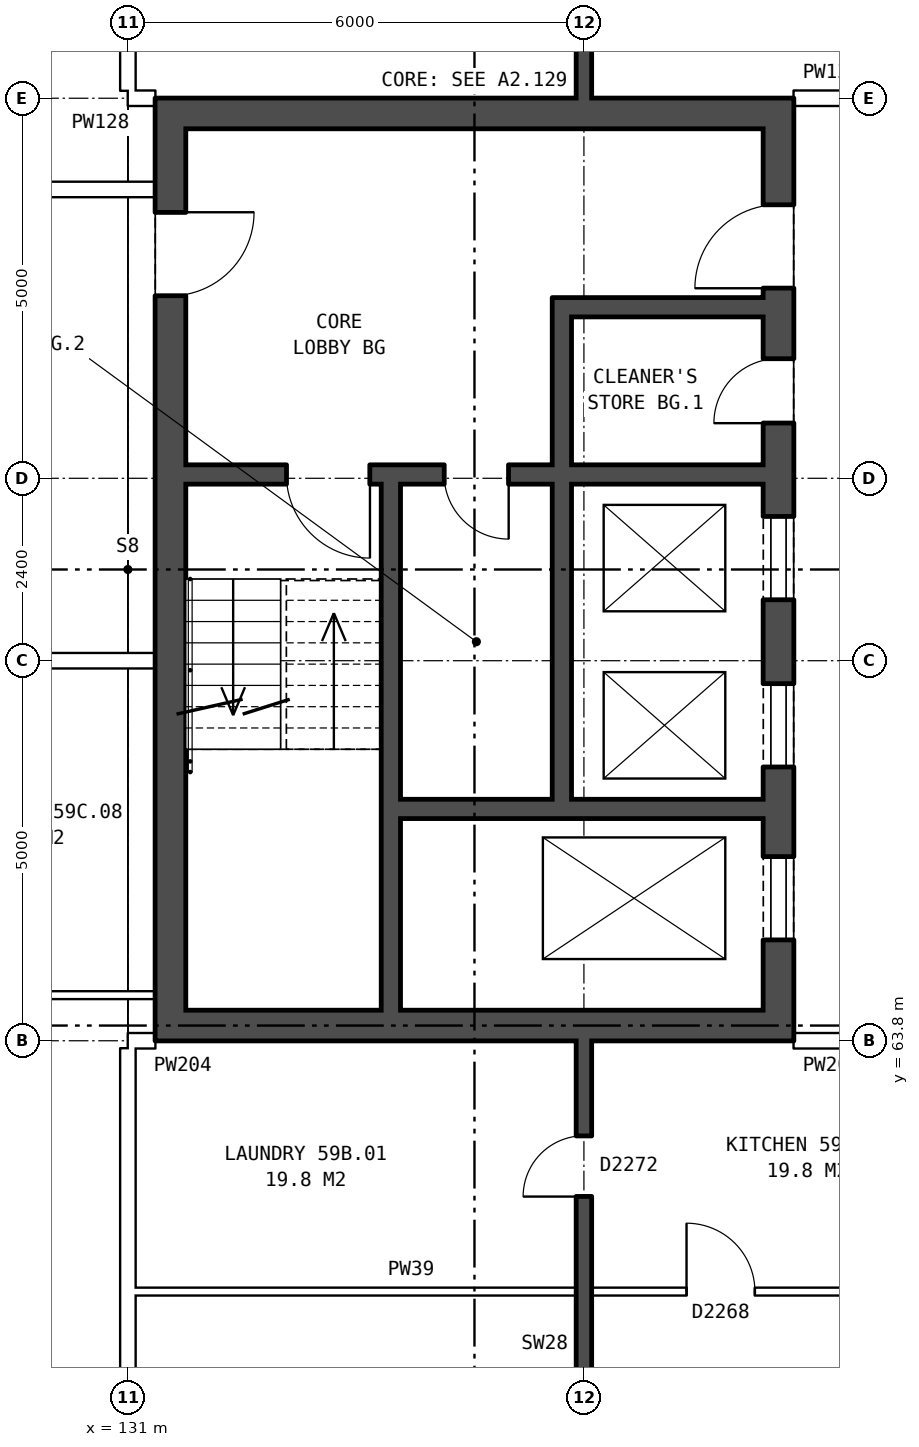
"""IFC4 building model, lengths in metres.
Left out: names, types, materials, properties, quantities, classifications, styles, units other than length and angle.
Written with IfcOpenShell. Run it as: python <this file> out.ifc"""

import sys

from ifc_helpers import new_model, si_unit, direction, frame, frame_2d, origin, place, context, subcontext, project, spatial, rectangle, extrude, element, fill, save


model = new_model("IFC4")
c1 = context("Model", 3, precision=1e-05, world=origin(), true_north=direction((0.0, 1.0)))
c2 = subcontext(c1, "Body", "Model", "MODEL_VIEW")
j1 = project(units=[si_unit("LENGTHUNIT", "METRE"), si_unit("PLANEANGLEUNIT", "RADIAN")], contexts=[c1])
p1 = place(None, origin())
s1 = spatial("IfcSite", under=j1, at=p1, CompositionType="ELEMENT")
p2 = place(p1, origin())
s2 = spatial("IfcBuilding", under=s1, at=p2, CompositionType="ELEMENT")
p3 = place(p2, frame((0.0, 0.0, 209.0)))
s3 = spatial("IfcBuildingStorey", under=s2, at=p3, CompositionType="ELEMENT", Elevation=209.0)
p4 = place(p3, frame((139.56, 63.8, 0.0), z_axis=(0.0, 0.0, 1.0), x_axis=(0.0, 1.0, 0.0)))
e1 = element("IfcWall", 1, at=p4, inside=s3, PredefinedType="SHEAR", context=c2, shape_type="SweptSolid", body=[
    extrude(rectangle(XDim=12.4, YDim=0.4, at=frame_2d((6.2, 0.0))), origin(), (0.0, 0.0, 1.0), 2.85),
])
p5 = place(p4, frame((1.325, 0.0, 0.0)))
e2 = element("IfcOpeningElement", 2, at=p5, cuts=e1, PredefinedType="OPENING", context=c2, shape_type="SweptSolid", body=[
    extrude(rectangle(XDim=1.1, YDim=2.1, at=frame_2d((0.55, 1.05))), frame((0.0, 0.21, 0.0), z_axis=(0.0, -1.0, 0.0), x_axis=(1.0, 0.0, 0.0)), (0.0, 0.0, 1.0), 0.42),
])
p6 = place(p4, frame((3.6, 0.0, 0.0)))
e3 = element("IfcOpeningElement", 3, at=p6, cuts=e1, PredefinedType="OPENING", context=c2, shape_type="SweptSolid", body=[
    extrude(rectangle(XDim=1.1, YDim=2.1, at=frame_2d((0.55, 1.05))), frame((0.0, 0.21, 0.0), z_axis=(0.0, -1.0, 0.0), x_axis=(1.0, 0.0, 0.0)), (0.0, 0.0, 1.0), 0.42),
])
p7 = place(p4, frame((5.8, 0.0, 0.0)))
e4 = element("IfcOpeningElement", 4, at=p7, cuts=e1, PredefinedType="OPENING", context=c2, shape_type="SweptSolid", body=[
    extrude(rectangle(XDim=1.1, YDim=2.1, at=frame_2d((0.55, 1.05))), frame((0.0, 0.21, 0.0), z_axis=(0.0, -1.0, 0.0), x_axis=(1.0, 0.0, 0.0)), (0.0, 0.0, 1.0), 0.42),
])
p8 = place(p4, frame((9.9, 0.0, 0.0)))
e5 = element("IfcOpeningElement", 5, at=p8, cuts=e1, PredefinedType="OPENING", context=c2, shape_type="SweptSolid", body=[
    extrude(rectangle(XDim=1.1, YDim=2.1, at=frame_2d((0.55, 1.05))), frame((0.0, 0.21, 0.0), z_axis=(0.0, -1.0, 0.0), x_axis=(1.0, 0.0, 0.0)), (0.0, 0.0, 1.0), 0.42),
])
p9 = place(p4, frame((8.125, 0.0, 0.0)))
e6 = element("IfcOpeningElement", 6, at=p9, cuts=e1, PredefinedType="OPENING", context=c2, shape_type="SweptSolid", body=[
    extrude(rectangle(XDim=0.85, YDim=2.1, at=frame_2d((0.425, 1.05))), frame((0.0, 0.21, 0.0), z_axis=(0.0, -1.0, 0.0), x_axis=(1.0, 0.0, 0.0)), (0.0, 0.0, 1.0), 0.42),
])
p10 = place(p3, frame((131.56, 63.8, 0.0), z_axis=(0.0, 0.0, 1.0), x_axis=(0.0, 1.0, 0.0)))
e7 = element("IfcWall", 7, at=p10, inside=s3, PredefinedType="SHEAR", context=c2, shape_type="SweptSolid", body=[
    extrude(rectangle(XDim=12.4, YDim=0.4, at=frame_2d((6.2, 0.0))), origin(), (0.0, 0.0, 1.0), 2.85),
])
p11 = place(p10, frame((9.8, 0.0, 0.0)))
e8 = element("IfcOpeningElement", 8, at=p11, cuts=e7, PredefinedType="OPENING", context=c2, shape_type="SweptSolid", body=[
    extrude(rectangle(XDim=1.1, YDim=2.1, at=frame_2d((0.55, 1.05))), frame((0.0, 0.21, 0.0), z_axis=(0.0, -1.0, 0.0), x_axis=(1.0, 0.0, 0.0)), (0.0, 0.0, 1.0), 0.42),
])
for number, where, z_axis, x_axis in (
    (9, (139.36, 64.0, 0.0), (0.0, 0.0, 1.0), (-1.0, 0.0, 0.0)),
    (10, (139.36, 76.0, 0.0), (0.0, 0.0, 1.0), (-1.0, 0.0, 0.0)),
):
    element("IfcWall", number, at=place(p3, frame(where, z_axis=z_axis, x_axis=x_axis)), inside=s3, PredefinedType="SHEAR", context=c2, shape_type="SweptSolid", body=[
        extrude(rectangle(XDim=7.6, YDim=0.4, at=frame_2d((3.8, 0.0))), origin(), (0.0, 0.0, 1.0), 2.85),
    ])
p12 = place(p3, frame((139.36, 66.85, 0.0), z_axis=(0.0, 0.0, 1.0), x_axis=(-1.0, 0.0, 0.0)))
e11 = element("IfcWall", 11, at=p12, inside=s3, PredefinedType="SHEAR", context=c2, shape_type="SweptSolid", body=[
    extrude(rectangle(XDim=4.775, YDim=0.25, at=frame_2d((2.388, 0.0))), origin(), (0.0, 0.0, 1.0), 2.85),
])
p13 = place(p3, frame((139.36, 71.25, 0.0), z_axis=(0.0, 0.0, 1.0), x_axis=(-1.0, 0.0, 0.0)))
e12 = element("IfcWall", 12, at=p13, inside=s3, PredefinedType="SHEAR", context=c2, shape_type="SweptSolid", body=[
    extrude(rectangle(XDim=7.6, YDim=0.25, at=frame_2d((3.8, 0.0))), origin(), (0.0, 0.0, 1.0), 2.85),
])
p14 = place(p13, frame((5.175, 0.0, 0.0)))
e13 = element("IfcOpeningElement", 13, at=p14, cuts=e12, PredefinedType="OPENING", context=c2, shape_type="SweptSolid", body=[
    extrude(rectangle(XDim=1.1, YDim=2.1, at=frame_2d((0.55, 1.05))), frame((0.0, 0.135, 0.0), z_axis=(0.0, -1.0, 0.0), x_axis=(1.0, 0.0, 0.0)), (0.0, 0.0, 1.0), 0.27),
])
p15 = place(p13, frame((3.35, 0.0, 0.0)))
e14 = element("IfcOpeningElement", 14, at=p15, cuts=e12, PredefinedType="OPENING", context=c2, shape_type="SweptSolid", body=[
    extrude(rectangle(XDim=0.85, YDim=2.1, at=frame_2d((0.425, 1.05))), frame((0.0, 0.135, 0.0), z_axis=(0.0, -1.0, 0.0), x_axis=(1.0, 0.0, 0.0)), (0.0, 0.0, 1.0), 0.27),
])
p16 = place(p3, frame((139.36, 73.45, 0.0), z_axis=(0.0, 0.0, 1.0), x_axis=(-1.0, 0.0, 0.0)))
e15 = element("IfcWall", 15, at=p16, inside=s3, PredefinedType="SHEAR", context=c2, shape_type="SweptSolid", body=[
    extrude(rectangle(XDim=2.525, YDim=0.25, at=frame_2d((1.263, 0.0))), origin(), (0.0, 0.0, 1.0), 2.85),
])
p17 = place(p3, frame((136.71, 66.975, 0.0), z_axis=(0.0, 0.0, 1.0), x_axis=(0.0, 1.0, 0.0)))
e16 = element("IfcWall", 16, at=p17, inside=s3, PredefinedType="SHEAR", context=c2, shape_type="SweptSolid", body=[
    extrude(rectangle(XDim=4.15, YDim=0.25, at=frame_2d((2.075, 0.0))), origin(), (0.0, 0.0, 1.0), 2.85),
])
p18 = place(p3, frame((136.71, 71.375, 0.0), z_axis=(0.0, 0.0, 1.0), x_axis=(0.0, 1.0, 0.0)))
e17 = element("IfcWall", 17, at=p18, inside=s3, PredefinedType="SHEAR", context=c2, shape_type="SweptSolid", body=[
    extrude(rectangle(XDim=2.2, YDim=0.25, at=frame_2d((1.1, 0.0))), origin(), (0.0, 0.0, 1.0), 2.85),
])
p19 = place(p3, frame((134.46, 64.2, 0.0), z_axis=(0.0, 0.0, 1.0), x_axis=(0.0, 1.0, 0.0)))
e18 = element("IfcWall", 18, at=p19, inside=s3, PredefinedType="SHEAR", context=c2, shape_type="SweptSolid", body=[
    extrude(rectangle(XDim=6.925, YDim=0.25, at=frame_2d((3.462, 0.0))), origin(), (0.0, 0.0, 1.0), 2.85),
])
p20 = place(p3, frame((131.1, 60.5, 0.0), z_axis=(0.0, 0.0, 1.0), x_axis=(1.0, 0.0, 0.0)))
e19 = element("IfcWall", 19, at=p20, inside=s3, PredefinedType="PARTITIONING", context=c2, shape_type="SweptSolid", body=[
    extrude(rectangle(XDim=11.8, YDim=0.1, at=frame_2d((5.9, 0.0))), origin(), (0.0, 0.0, 1.0), 2.85),
])
p21 = place(p20, frame((7.25, 0.0, 0.0)))
e20 = element("IfcOpeningElement", 20, at=p21, cuts=e19, PredefinedType="OPENING", context=c2, shape_type="SweptSolid", body=[
    extrude(rectangle(XDim=0.9, YDim=2.1, at=frame_2d((0.45, 1.05))), frame((0.0, 0.06, 0.0), z_axis=(0.0, -1.0, 0.0), x_axis=(1.0, 0.0, 0.0)), (0.0, 0.0, 1.0), 0.12),
])
p22 = place(p20, frame((10.2, 0.0, 0.0)))
e21 = element("IfcOpeningElement", 21, at=p22, cuts=e19, PredefinedType="OPENING", context=c2, shape_type="SweptSolid", body=[
    extrude(rectangle(XDim=0.9, YDim=2.1, at=frame_2d((0.45, 1.05))), frame((0.0, 0.06, 0.0), z_axis=(0.0, -1.0, 0.0), x_axis=(1.0, 0.0, 0.0)), (0.0, 0.0, 1.0), 0.12),
])
p23 = place(p3, frame((131.0, 63.8, 0.0), z_axis=(0.0, 0.0, 1.0), x_axis=(1.0, 0.0, 0.0)))
e22 = element("IfcWall", 22, at=p23, inside=s3, PredefinedType="PARTITIONING", context=c2, shape_type="SweptSolid", body=[
    extrude(rectangle(XDim=0.36, YDim=0.2, at=frame_2d((0.18, 0.0))), origin(), (0.0, 0.0, 1.0), 2.85),
])
p24 = place(p3, frame((139.76, 63.8, 0.0), z_axis=(0.0, 0.0, 1.0), x_axis=(1.0, 0.0, 0.0)))
e23 = element("IfcWall", 23, at=p24, inside=s3, PredefinedType="PARTITIONING", context=c2, shape_type="SweptSolid", body=[
    extrude(rectangle(XDim=3.0, YDim=0.2, at=frame_2d((1.5, 0.0))), origin(), (0.0, 0.0, 1.0), 2.85),
])
p25 = place(p24, frame((1.0, 0.0, 0.0)))
e24 = element("IfcOpeningElement", 24, at=p25, cuts=e23, PredefinedType="OPENING", context=c2, shape_type="SweptSolid", body=[
    extrude(rectangle(XDim=1.0, YDim=2.1, at=frame_2d((0.5, 1.05))), frame((0.0, 0.11, 0.0), z_axis=(0.0, -1.0, 0.0), x_axis=(1.0, 0.0, 0.0)), (0.0, 0.0, 1.0), 0.22),
])
p26 = place(p3, frame((127.912, 64.4, 0.0), z_axis=(0.0, 0.0, 1.0), x_axis=(1.0, 0.0, 0.0)))
e25 = element("IfcWall", 25, at=p26, inside=s3, PredefinedType="PARTITIONING", context=c2, shape_type="SweptSolid", body=[
    extrude(rectangle(XDim=3.448, YDim=0.1, at=frame_2d((1.724, 0.0))), origin(), (0.0, 0.0, 1.0), 2.85),
])
p27 = place(p3, frame((75.64, 68.8, 0.0), z_axis=(0.0, 0.0, 1.0), x_axis=(1.0, 0.0, 0.0)))
e26 = element("IfcWall", 26, at=p27, inside=s3, PredefinedType="PARTITIONING", context=c2, shape_type="SweptSolid", body=[
    extrude(rectangle(XDim=55.72, YDim=0.2, at=frame_2d((27.86, 0.0))), origin(), (0.0, 0.0, 1.0), 2.85),
])
p28 = place(p27, frame((5.191, 0.0, 0.0)))
e27 = element("IfcOpeningElement", 27, at=p28, cuts=e26, PredefinedType="OPENING", context=c2, shape_type="SweptSolid", body=[
    extrude(rectangle(XDim=1.0, YDim=2.1, at=frame_2d((0.5, 1.05))), frame((0.0, 0.11, 0.0), z_axis=(0.0, -1.0, 0.0), x_axis=(1.0, 0.0, 0.0)), (0.0, 0.0, 1.0), 0.22),
])
p29 = place(p27, frame((15.678, 0.0, 0.0)))
e28 = element("IfcOpeningElement", 28, at=p29, cuts=e26, PredefinedType="OPENING", context=c2, shape_type="SweptSolid", body=[
    extrude(rectangle(XDim=1.0, YDim=2.1, at=frame_2d((0.5, 1.05))), frame((0.0, 0.11, 0.0), z_axis=(0.0, -1.0, 0.0), x_axis=(1.0, 0.0, 0.0)), (0.0, 0.0, 1.0), 0.22),
])
p30 = place(p27, frame((22.553, 0.0, 0.0)))
e29 = element("IfcOpeningElement", 29, at=p30, cuts=e26, PredefinedType="OPENING", context=c2, shape_type="SweptSolid", body=[
    extrude(rectangle(XDim=1.0, YDim=2.1, at=frame_2d((0.5, 1.05))), frame((0.0, 0.11, 0.0), z_axis=(0.0, -1.0, 0.0), x_axis=(1.0, 0.0, 0.0)), (0.0, 0.0, 1.0), 0.22),
])
p31 = place(p27, frame((32.866, 0.0, 0.0)))
e30 = element("IfcOpeningElement", 30, at=p31, cuts=e26, PredefinedType="OPENING", context=c2, shape_type="SweptSolid", body=[
    extrude(rectangle(XDim=1.0, YDim=2.1, at=frame_2d((0.5, 1.05))), frame((0.0, 0.11, 0.0), z_axis=(0.0, -1.0, 0.0), x_axis=(1.0, 0.0, 0.0)), (0.0, 0.0, 1.0), 0.22),
])
p32 = place(p27, frame((43.178, 0.0, 0.0)))
e31 = element("IfcOpeningElement", 31, at=p32, cuts=e26, PredefinedType="OPENING", context=c2, shape_type="SweptSolid", body=[
    extrude(rectangle(XDim=1.0, YDim=2.1, at=frame_2d((0.5, 1.05))), frame((0.0, 0.11, 0.0), z_axis=(0.0, -1.0, 0.0), x_axis=(1.0, 0.0, 0.0)), (0.0, 0.0, 1.0), 0.22),
])
p33 = place(p27, frame((50.053, 0.0, 0.0)))
e32 = element("IfcOpeningElement", 32, at=p33, cuts=e26, PredefinedType="OPENING", context=c2, shape_type="SweptSolid", body=[
    extrude(rectangle(XDim=1.0, YDim=2.1, at=frame_2d((0.5, 1.05))), frame((0.0, 0.11, 0.0), z_axis=(0.0, -1.0, 0.0), x_axis=(1.0, 0.0, 0.0)), (0.0, 0.0, 1.0), 0.22),
])
p34 = place(p3, frame((124.475, 75.0, 0.0), z_axis=(0.0, 0.0, 1.0), x_axis=(1.0, 0.0, 0.0)))
e33 = element("IfcWall", 33, at=p34, inside=s3, PredefinedType="PARTITIONING", context=c2, shape_type="SweptSolid", body=[
    extrude(rectangle(XDim=6.885, YDim=0.2, at=frame_2d((3.442, 0.0))), origin(), (0.0, 0.0, 1.0), 2.85),
])
p35 = place(p34, frame((2.992, 0.0, 0.0)))
e34 = element("IfcOpeningElement", 34, at=p35, cuts=e33, PredefinedType="OPENING", context=c2, shape_type="SweptSolid", body=[
    extrude(rectangle(XDim=0.9, YDim=2.1, at=frame_2d((0.45, 1.05))), frame((0.0, 0.11, 0.0), z_axis=(0.0, -1.0, 0.0), x_axis=(1.0, 0.0, 0.0)), (0.0, 0.0, 1.0), 0.22),
])
p36 = place(p3, frame((131.0, 76.2, 0.0), z_axis=(0.0, 0.0, 1.0), x_axis=(1.0, 0.0, 0.0)))
e35 = element("IfcWall", 35, at=p36, inside=s3, PredefinedType="PARTITIONING", context=c2, shape_type="SweptSolid", body=[
    extrude(rectangle(XDim=0.36, YDim=0.2, at=frame_2d((0.18, 0.0))), origin(), (0.0, 0.0, 1.0), 2.85),
])
p37 = place(p3, frame((139.76, 76.2, 0.0), z_axis=(0.0, 0.0, 1.0), x_axis=(1.0, 0.0, 0.0)))
e36 = element("IfcWall", 36, at=p37, inside=s3, PredefinedType="PARTITIONING", context=c2, shape_type="SweptSolid", body=[
    extrude(rectangle(XDim=3.0, YDim=0.2, at=frame_2d((1.5, 0.0))), origin(), (0.0, 0.0, 1.0), 2.85),
])
p38 = place(p37, frame((1.0, 0.0, 0.0)))
e37 = element("IfcOpeningElement", 37, at=p38, cuts=e36, PredefinedType="OPENING", context=c2, shape_type="SweptSolid", body=[
    extrude(rectangle(XDim=1.0, YDim=2.1, at=frame_2d((0.5, 1.05))), frame((0.0, 0.11, 0.0), z_axis=(0.0, -1.0, 0.0), x_axis=(1.0, 0.0, 0.0)), (0.0, 0.0, 1.0), 0.22),
])
for number, where, z_axis, x_axis in (
    (38, (131.0, 54.36, 0.0), (0.0, 0.0, 1.0), (0.0, 1.0, 0.0)),
    (39, (131.0, 76.3, 0.0), (0.0, 0.0, 1.0), (0.0, 1.0, 0.0)),
):
    element("IfcWall", number, at=place(p3, frame(where, z_axis=z_axis, x_axis=x_axis)), inside=s3, PredefinedType="PARTITIONING", context=c2, shape_type="SweptSolid", body=[
        extrude(rectangle(XDim=9.34, YDim=0.2, at=frame_2d((4.67, 0.0))), origin(), (0.0, 0.0, 1.0), 2.85),
    ])
p39 = place(p3, frame((137.0, 54.36, 0.0), z_axis=(0.0, 0.0, 1.0), x_axis=(0.0, 1.0, 0.0)))
e40 = element("IfcWall", 40, at=p39, inside=s3, PredefinedType="SOLIDWALL", context=c2, shape_type="SweptSolid", body=[
    extrude(rectangle(XDim=9.44, YDim=0.2, at=frame_2d((4.72, 0.0))), origin(), (0.0, 0.0, 1.0), 2.85),
])
p40 = place(p39, frame((2.62, 0.0, 0.0)))
e41 = element("IfcOpeningElement", 41, at=p40, cuts=e40, PredefinedType="OPENING", context=c2, shape_type="SweptSolid", body=[
    extrude(rectangle(XDim=0.9, YDim=2.1, at=frame_2d((0.45, 1.05))), frame((0.0, 0.11, 0.0), z_axis=(0.0, -1.0, 0.0), x_axis=(1.0, 0.0, 0.0)), (0.0, 0.0, 1.0), 0.22),
])
p41 = place(p39, frame((7.39, 0.0, 0.0)))
e42 = element("IfcOpeningElement", 42, at=p41, cuts=e40, PredefinedType="OPENING", context=c2, shape_type="SweptSolid", body=[
    extrude(rectangle(XDim=0.8, YDim=2.1, at=frame_2d((0.4, 1.05))), frame((0.0, 0.11, 0.0), z_axis=(0.0, -1.0, 0.0), x_axis=(1.0, 0.0, 0.0)), (0.0, 0.0, 1.0), 0.22),
])
p42 = place(p3, frame((137.0, 76.2, 0.0), z_axis=(0.0, 0.0, 1.0), x_axis=(0.0, 1.0, 0.0)))
e43 = element("IfcWall", 43, at=p42, inside=s3, PredefinedType="SOLIDWALL", context=c2, shape_type="SweptSolid", body=[
    extrude(rectangle(XDim=9.44, YDim=0.2, at=frame_2d((4.72, 0.0))), origin(), (0.0, 0.0, 1.0), 2.85),
])
p43 = place(p42, frame((5.92, 0.0, 0.0)))
e44 = element("IfcOpeningElement", 44, at=p43, cuts=e43, PredefinedType="OPENING", context=c2, shape_type="SweptSolid", body=[
    extrude(rectangle(XDim=0.9, YDim=2.1, at=frame_2d((0.45, 1.05))), frame((0.0, 0.11, 0.0), z_axis=(0.0, -1.0, 0.0), x_axis=(1.0, 0.0, 0.0)), (0.0, 0.0, 1.0), 0.22),
])
p44 = place(p42, frame((1.25, 0.0, 0.0)))
e45 = element("IfcOpeningElement", 45, at=p44, cuts=e43, PredefinedType="OPENING", context=c2, shape_type="SweptSolid", body=[
    extrude(rectangle(XDim=0.8, YDim=2.1, at=frame_2d((0.4, 1.05))), frame((0.0, 0.11, 0.0), z_axis=(0.0, -1.0, 0.0), x_axis=(1.0, 0.0, 0.0)), (0.0, 0.0, 1.0), 0.22),
])
p45 = place(p5, origin())
e46 = element("IfcDoor", 46, at=p45, inside=s3, OperationType="DOUBLE_DOOR_SLIDING", PredefinedType="DOOR", context=c2, shape_type="SweptSolid", body=[
    extrude(rectangle(XDim=1.1, YDim=2.1, at=frame_2d((0.55, 1.05))), frame((0.0, 0.185, 0.0), z_axis=(0.0, -1.0, 0.0), x_axis=(1.0, 0.0, 0.0)), (0.0, 0.0, 1.0), 0.05),
])
fill(e2, e46)
p46 = place(p6, origin())
e47 = element("IfcDoor", 47, at=p46, inside=s3, OperationType="DOUBLE_DOOR_SLIDING", PredefinedType="DOOR", context=c2, shape_type="SweptSolid", body=[
    extrude(rectangle(XDim=1.1, YDim=2.1, at=frame_2d((0.55, 1.05))), frame((0.0, 0.185, 0.0), z_axis=(0.0, -1.0, 0.0), x_axis=(1.0, 0.0, 0.0)), (0.0, 0.0, 1.0), 0.05),
])
fill(e3, e47)
p47 = place(p7, origin())
e48 = element("IfcDoor", 48, at=p47, inside=s3, OperationType="DOUBLE_DOOR_SLIDING", PredefinedType="DOOR", context=c2, shape_type="SweptSolid", body=[
    extrude(rectangle(XDim=1.1, YDim=2.1, at=frame_2d((0.55, 1.05))), frame((0.0, 0.185, 0.0), z_axis=(0.0, -1.0, 0.0), x_axis=(1.0, 0.0, 0.0)), (0.0, 0.0, 1.0), 0.05),
])
fill(e4, e48)
p48 = place(p8, origin())
e49 = element("IfcDoor", 49, at=p48, inside=s3, OperationType="SINGLE_SWING_LEFT", PredefinedType="DOOR", context=c2, shape_type="SweptSolid", body=[
    extrude(rectangle(XDim=1.1, YDim=2.1, at=frame_2d((0.55, 1.05))), frame((0.0, 0.185, 0.0), z_axis=(0.0, -1.0, 0.0), x_axis=(1.0, 0.0, 0.0)), (0.0, 0.0, 1.0), 0.05),
])
fill(e5, e49)
p49 = place(p14, origin())
e50 = element("IfcDoor", 50, at=p49, inside=s3, OperationType="SINGLE_SWING_LEFT", PredefinedType="DOOR", context=c2, shape_type="SweptSolid", body=[
    extrude(rectangle(XDim=1.1, YDim=2.1, at=frame_2d((0.55, 1.05))), frame((0.0, 0.025, 0.0), z_axis=(0.0, -1.0, 0.0), x_axis=(1.0, 0.0, 0.0)), (0.0, 0.0, 1.0), 0.05),
])
fill(e13, e50)
p50 = place(p9, origin())
e51 = element("IfcDoor", 51, at=p50, inside=s3, OperationType="SINGLE_SWING_LEFT", PredefinedType="DOOR", context=c2, shape_type="SweptSolid", body=[
    extrude(rectangle(XDim=0.85, YDim=2.1, at=frame_2d((0.425, 1.05))), frame((0.0, 0.185, 0.0), z_axis=(0.0, -1.0, 0.0), x_axis=(1.0, 0.0, 0.0)), (0.0, 0.0, 1.0), 0.05),
])
fill(e6, e51)
p51 = place(p15, origin())
e52 = element("IfcDoor", 52, at=p51, inside=s3, OperationType="SINGLE_SWING_LEFT", PredefinedType="DOOR", context=c2, shape_type="SweptSolid", body=[
    extrude(rectangle(XDim=0.85, YDim=2.1, at=frame_2d((0.425, 1.05))), frame((0.0, 0.025, 0.0), z_axis=(0.0, -1.0, 0.0), x_axis=(1.0, 0.0, 0.0)), (0.0, 0.0, 1.0), 0.05),
])
fill(e14, e52)
p52 = place(p11, frame((1.1, 0.0, 0.0), z_axis=(0.0, 0.0, 1.0), x_axis=(-1.0, 0.0, 0.0)))
e53 = element("IfcDoor", 53, at=p52, inside=s3, OperationType="SINGLE_SWING_LEFT", PredefinedType="DOOR", context=c2, shape_type="SweptSolid", body=[
    extrude(rectangle(XDim=1.1, YDim=2.1, at=frame_2d((0.55, 1.05))), frame((0.0, 0.185, 0.0), z_axis=(0.0, -1.0, 0.0), x_axis=(1.0, 0.0, 0.0)), (0.0, 0.0, 1.0), 0.05),
])
fill(e8, e53)
p53 = place(p21, origin())
e54 = element("IfcDoor", 54, at=p53, inside=s3, OperationType="SINGLE_SWING_LEFT", PredefinedType="DOOR", context=c2, shape_type="SweptSolid", body=[
    extrude(rectangle(XDim=0.9, YDim=2.1, at=frame_2d((0.45, 1.05))), frame((0.0, 0.025, 0.0), z_axis=(0.0, -1.0, 0.0), x_axis=(1.0, 0.0, 0.0)), (0.0, 0.0, 1.0), 0.05),
])
fill(e20, e54)
p54 = place(p41, origin())
e55 = element("IfcDoor", 55, at=p54, inside=s3, OperationType="SINGLE_SWING_LEFT", PredefinedType="DOOR", context=c2, shape_type="SweptSolid", body=[
    extrude(rectangle(XDim=0.8, YDim=2.1, at=frame_2d((0.4, 1.05))), frame((0.0, 0.025, 0.0), z_axis=(0.0, -1.0, 0.0), x_axis=(1.0, 0.0, 0.0)), (0.0, 0.0, 1.0), 0.05),
])
fill(e42, e55)
save(model, sys.argv[1])
